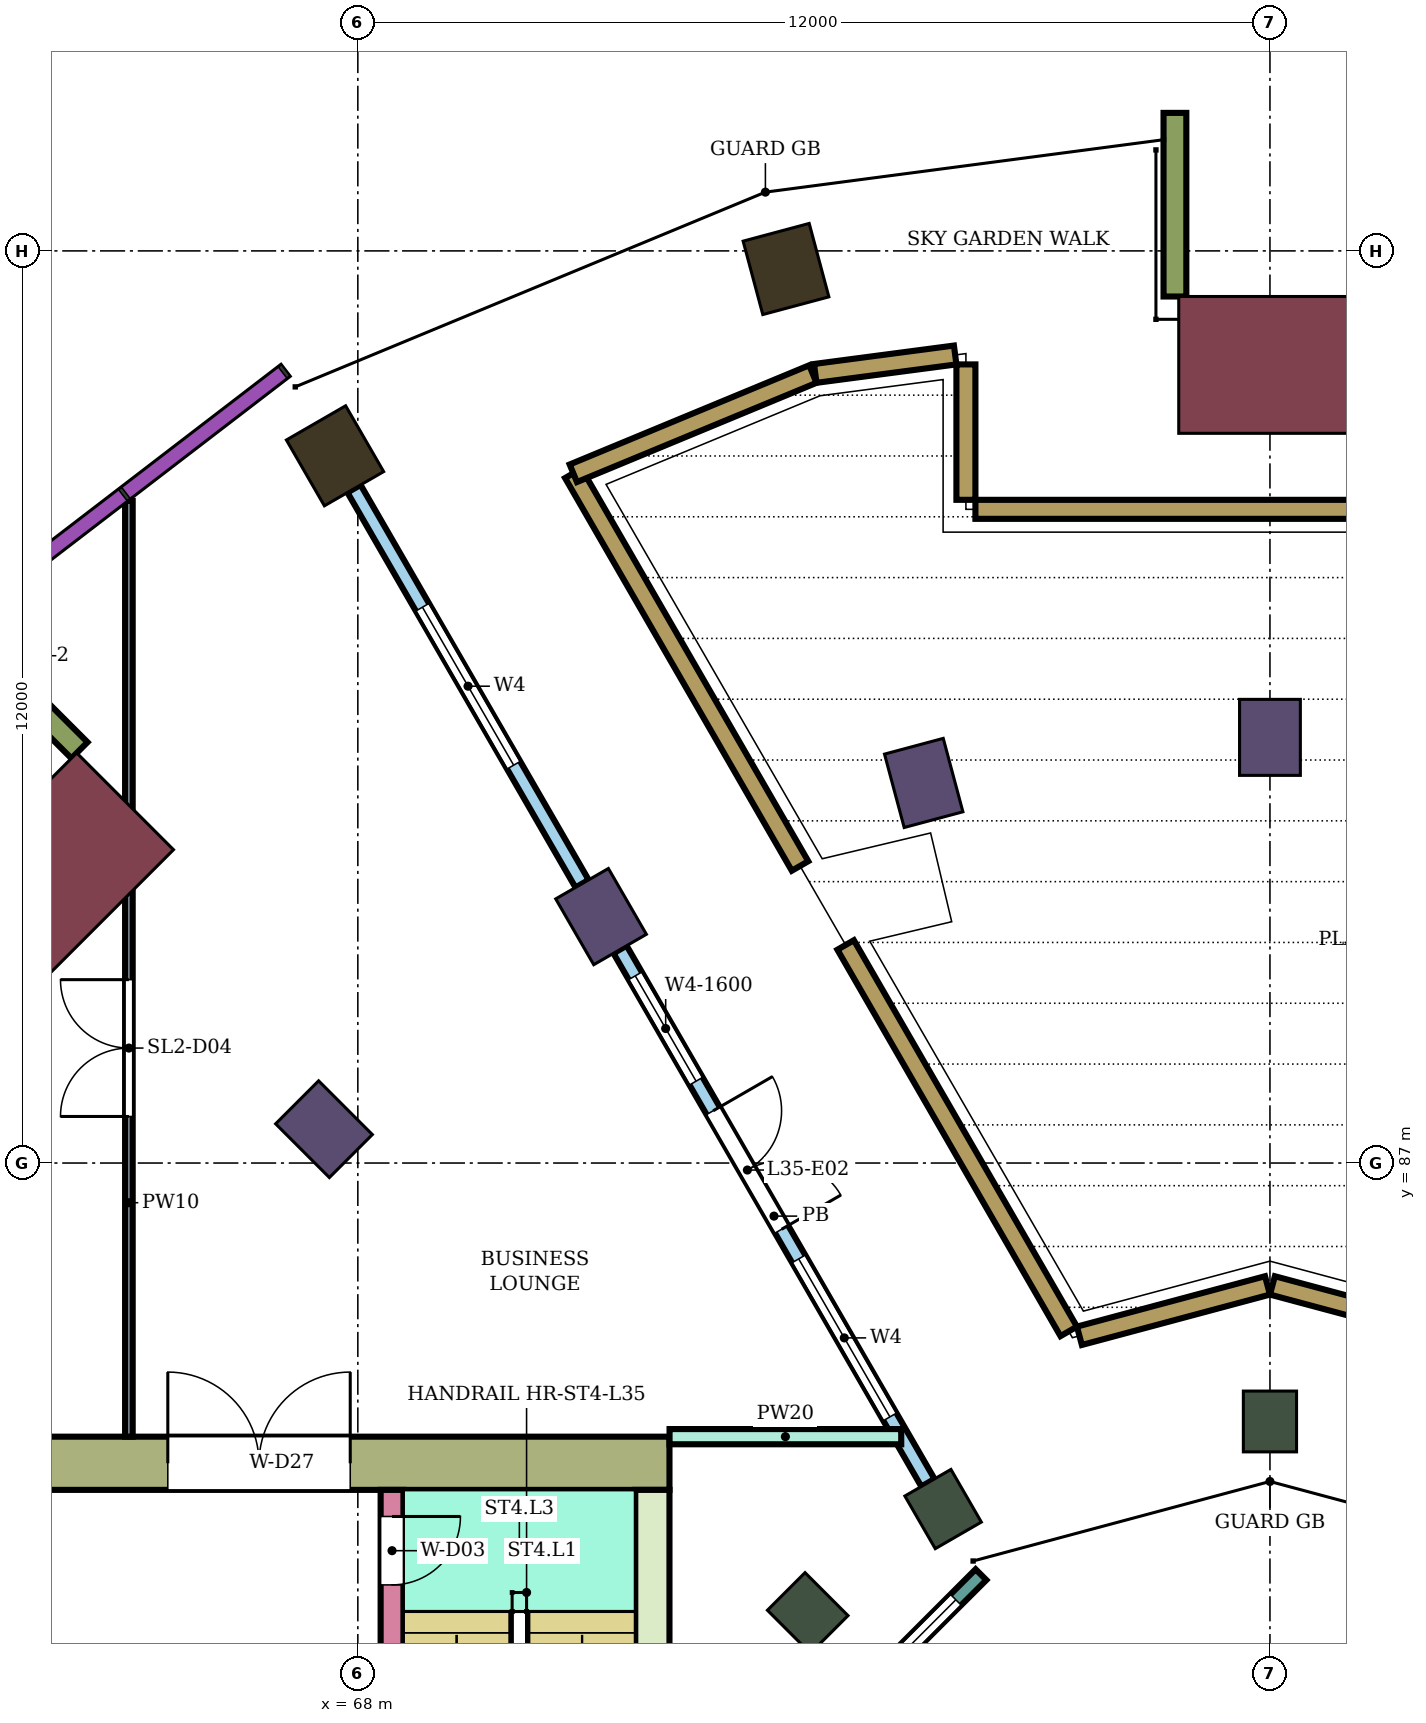
"""IFC4 building model, lengths in metres.
Left out: names, types, materials, properties, quantities, classifications, styles, units other than length and angle.
Written with IfcOpenShell. Run it as: python <this file> out.ifc"""

import sys

from ifc_helpers import new_model, si_unit, direction, frame, frame_2d, origin, origin_2d, place, context, subcontext, project, spatial, rectangle, extrude, element, fill, save


model = new_model("IFC4")
c1 = context("Model", 3, precision=1e-05, world=origin(), true_north=direction((0.0, 1.0)))
c2 = subcontext(c1, "Body", "Model", "MODEL_VIEW")
j1 = project(units=[si_unit("LENGTHUNIT", "METRE"), si_unit("PLANEANGLEUNIT", "RADIAN")], contexts=[c1])
p1 = place(None, origin())
s1 = spatial("IfcSite", under=j1, at=p1, CompositionType="ELEMENT")
p2 = place(p1, origin())
s2 = spatial("IfcBuilding", under=s1, at=p2, CompositionType="ELEMENT")
p3 = place(p2, frame((0.0, 0.0, 149.7)))
s3 = spatial("IfcBuildingStorey", under=s2, at=p3, CompositionType="ELEMENT", Elevation=149.7)
for number, where, z_axis, x_axis in (
    (1, (73.633, 98.762, 0.0), (0.0, 0.0, 1.0), (-0.259, 0.966, 0.0)),
    (2, (67.7, 96.304, 0.0), (0.0, 0.0, 1.0), (-0.5, 0.866, 0.0)),
):
    element("IfcColumn", number, at=place(p3, frame(where, z_axis=z_axis, x_axis=x_axis)), inside=s3, PredefinedType="COLUMN", context=c2, shape_type="SweptSolid", body=[
        extrude(rectangle(XDim=1.0, YDim=0.9, at=origin_2d()), origin(), (0.0, 0.0, 1.0), 8.0),
    ])
for number, where, z_axis, x_axis in (
    (3, (80.0, 92.6, 0.0), (0.0, 0.0, 1.0), (0.0, 1.0, 0.0)),
    (4, (75.445, 92.0, 0.0), (0.0, 0.0, 1.0), (-0.259, 0.966, 0.0)),
    (5, (71.2, 90.242, 0.0), (0.0, 0.0, 1.0), (-0.5, 0.866, 0.0)),
    (6, (67.555, 87.445, 0.0), (0.0, 0.0, 1.0), (-0.707, 0.707, 0.0)),
):
    element("IfcColumn", number, at=place(p3, frame(where, z_axis=z_axis, x_axis=x_axis)), inside=s3, PredefinedType="COLUMN", context=c2, shape_type="SweptSolid", body=[
        extrude(rectangle(XDim=1.0, YDim=0.8, at=origin_2d()), origin(), (0.0, 0.0, 1.0), 8.0),
    ])
for number, where, z_axis, x_axis in (
    (7, (80.0, 83.6, 0.0), (0.0, 0.0, 1.0), (0.0, 1.0, 0.0)),
    (8, (75.7, 82.448, 0.0), (0.0, 0.0, 1.0), (-0.5, 0.866, 0.0)),
    (9, (73.919, 81.081, 0.0), (0.0, 0.0, 1.0), (-0.707, 0.707, 0.0)),
):
    element("IfcColumn", number, at=place(p3, frame(where, z_axis=z_axis, x_axis=x_axis)), inside=s3, PredefinedType="COLUMN", context=c2, shape_type="SweptSolid", body=[
        extrude(rectangle(XDim=0.8, YDim=0.7, at=origin_2d()), origin(), (0.0, 0.0, 1.0), 8.0),
    ])
for number, where, z_axis, x_axis in (
    (10, (80.0, 97.5, 0.0), (0.0, 0.0, 1.0), (0.0, 1.0, 0.0)),
    (11, (64.09, 90.91, 0.0), (0.0, 0.0, 1.0), (-0.707, 0.707, 0.0)),
):
    element("IfcColumn", number, at=place(p3, frame(where, z_axis=z_axis, x_axis=x_axis)), inside=s3, PredefinedType="COLUMN", context=c2, shape_type="SweptSolid", body=[
        extrude(rectangle(XDim=1.8, YDim=2.4, at=origin_2d()), origin(), (0.0, 0.0, 1.0), 8.0),
    ])
p4 = place(p3, frame((72.1, 83.05, 0.0), z_axis=(0.0, 0.0, 1.0), x_axis=(-1.0, 0.0, 0.0)))
e12 = element("IfcWall", 12, at=p4, inside=s3, PredefinedType="SHEAR", context=c2, shape_type="SweptSolid", body=[
    extrude(rectangle(XDim=14.8, YDim=0.7, at=frame_2d((7.4, 0.0))), origin(), (0.0, 0.0, 1.0), 7.68),
])
p5 = place(p4, frame((4.2, 0.0, 0.0)))
e13 = element("IfcOpeningElement", 13, at=p5, cuts=e12, PredefinedType="OPENING", context=c2, shape_type="SweptSolid", body=[
    extrude(rectangle(XDim=2.4, YDim=2.4, at=frame_2d((1.2, 1.2))), frame((0.0, 0.36, 0.0), z_axis=(0.0, -1.0, 0.0), x_axis=(1.0, 0.0, 0.0)), (0.0, 0.0, 1.0), 0.72),
])
p6 = place(p3, frame((71.875, 82.7, 0.0), z_axis=(0.0, 0.0, 1.0), x_axis=(0.0, -1.0, 0.0)))
e14 = element("IfcWall", 14, at=p6, inside=s3, PredefinedType="SHEAR", context=c2, shape_type="SweptSolid", body=[
    extrude(rectangle(XDim=7.7, YDim=0.45, at=frame_2d((3.85, 0.0))), origin(), (0.0, 0.0, 1.0), 7.68),
])
p7 = place(p3, frame((68.45, 82.7, 0.0), z_axis=(0.0, 0.0, 1.0), x_axis=(0.0, -1.0, 0.0)))
e15 = element("IfcWall", 15, at=p7, inside=s3, PredefinedType="SHEAR", context=c2, shape_type="SweptSolid", body=[
    extrude(rectangle(XDim=7.7, YDim=0.3, at=frame_2d((3.85, 0.0))), origin(), (0.0, 0.0, 1.0), 7.68),
])
p8 = place(p7, frame((0.35, 0.0, 0.0)))
e16 = element("IfcOpeningElement", 16, at=p8, cuts=e15, PredefinedType="OPENING", context=c2, shape_type="SweptSolid", body=[
    extrude(rectangle(XDim=0.9, YDim=2.1, at=frame_2d((0.45, 1.05))), frame((0.0, 0.16, 0.0), z_axis=(0.0, -1.0, 0.0), x_axis=(1.0, 0.0, 0.0)), (0.0, 0.0, 1.0), 0.32),
])
for number, where, z_axis, x_axis in (
    (17, (78.75, 98.4, 0.0), (0.0, 0.0, 1.0), (0.0, 1.0, 0.0)),
    (18, (64.338, 92.43, 0.0), (0.0, 0.0, 1.0), (-0.707, 0.707, 0.0)),
):
    element("IfcWall", number, at=place(p3, frame(where, z_axis=z_axis, x_axis=x_axis)), inside=s3, PredefinedType="NOTDEFINED", context=c2, shape_type="SweptSolid", body=[
        extrude(rectangle(XDim=2.416, YDim=0.3, at=frame_2d((1.208, 0.0))), origin(), (0.0, 0.0, 1.0), 8.0),
    ])
p9 = place(p3, frame((76.198, 81.585, 0.0), z_axis=(0.0, 0.0, 1.0), x_axis=(-0.707106781187, -0.707106781187, 0.0)))
e19 = element("IfcWall", 19, at=p9, inside=s3, PredefinedType="NOTDEFINED", context=c2, shape_type="SweptSolid", body=[
    extrude(rectangle(XDim=3.936, YDim=0.2, at=frame_2d((1.968, 0.0))), origin(), (0.0, 0.0, 1.0), 8.0),
])
p10 = place(p9, frame((0.468, 0.0, 0.9)))
e20 = element("IfcOpeningElement", 20, at=p10, cuts=e19, PredefinedType="OPENING", context=c2, shape_type="SweptSolid", body=[
    extrude(rectangle(XDim=3.0, YDim=2.3, at=frame_2d((1.5, 1.15))), frame((0.0, 0.11, 0.0), z_axis=(0.0, -1.0, 0.0), x_axis=(1.0, 0.0, 0.0)), (0.0, 0.0, 1.0), 0.22),
])
p11 = place(p3, frame((70.835, 96.074, 0.0), z_axis=(0.0, 0.0, 1.0), x_axis=(0.500003486784, -0.866023390679, 0.0)))
e21 = element("IfcWall", 21, at=p11, inside=s3, PredefinedType="USERDEFINED", context=c2, shape_type="SweptSolid", body=[
    extrude(rectangle(XDim=5.966, YDim=0.25, at=frame_2d((2.983, 0.0))), origin(), (0.0, 0.0, 1.0), 0.6),
])
p12 = place(p3, frame((74.418, 89.869, 0.0), z_axis=(0.0, 0.0, 1.0), x_axis=(0.499999689456, -0.866025583077, 0.0)))
e22 = element("IfcWall", 22, at=p12, inside=s3, PredefinedType="USERDEFINED", context=c2, shape_type="SweptSolid", body=[
    extrude(rectangle(XDim=5.87, YDim=0.25, at=frame_2d((2.935, 0.0))), origin(), (0.0, 0.0, 1.0), 0.6),
])
for number, where, z_axis, x_axis in (
    (23, (77.493, 84.727, 0.0), (0.0, 0.0, 1.0), (0.966, 0.259, 0.0)),
    (24, (80.032, 85.39, 0.0), (0.0, 0.0, 1.0), (0.966, -0.259, 0.0)),
):
    element("IfcWall", number, at=place(p3, frame(where, z_axis=z_axis, x_axis=x_axis)), inside=s3, PredefinedType="USERDEFINED", context=c2, shape_type="SweptSolid", body=[
        extrude(rectangle(XDim=2.562, YDim=0.25, at=frame_2d((1.281, 0.0))), origin(), (0.0, 0.0, 1.0), 0.6),
    ])
p13 = place(p3, frame((83.875, 95.6, 0.0), z_axis=(0.0, 0.0, 1.0), x_axis=(-1.0, 0.0, 0.0)))
e25 = element("IfcWall", 25, at=p13, inside=s3, PredefinedType="USERDEFINED", context=c2, shape_type="SweptSolid", body=[
    extrude(rectangle(XDim=7.75, YDim=0.25, at=frame_2d((3.875, 0.0))), origin(), (0.0, 0.0, 1.0), 0.6),
])
p14 = place(p3, frame((76.0, 95.725, 0.0), z_axis=(0.0, 0.0, 1.0), x_axis=(0.0, 1.0, 0.0)))
e26 = element("IfcWall", 26, at=p14, inside=s3, PredefinedType="USERDEFINED", context=c2, shape_type="SweptSolid", body=[
    extrude(rectangle(XDim=1.781, YDim=0.25, at=frame_2d((0.891, 0.0))), origin(), (0.0, 0.0, 1.0), 0.6),
])
p15 = place(p3, frame((75.859, 97.631, 0.0), z_axis=(0.0, 0.0, 1.0), x_axis=(-0.991436829887, -0.130587182926, 0.0)))
e27 = element("IfcWall", 27, at=p15, inside=s3, PredefinedType="USERDEFINED", context=c2, shape_type="SweptSolid", body=[
    extrude(rectangle(XDim=1.856, YDim=0.25, at=frame_2d((0.928, 0.0))), origin(), (0.0, 0.0, 1.0), 0.6),
])
p16 = place(p3, frame((73.986, 97.38, 0.0), z_axis=(0.0, 0.0, 1.0), x_axis=(-0.923871147788, -0.38270367425, 0.0)))
e28 = element("IfcWall", 28, at=p16, inside=s3, PredefinedType="USERDEFINED", context=c2, shape_type="SweptSolid", body=[
    extrude(rectangle(XDim=3.411, YDim=0.25, at=frame_2d((1.706, 0.0))), origin(), (0.0, 0.0, 1.0), 0.6),
])
p17 = place(p3, frame((75.5, 82.794, 0.0), z_axis=(0.0, 0.0, 1.0), x_axis=(-0.499999880539, 0.866025472755, 0.0)))
e29 = element("IfcWall", 29, at=p17, inside=s3, PredefinedType="NOTDEFINED", context=c2, shape_type="SweptSolid", body=[
    extrude(rectangle(XDim=8.1, YDim=0.2, at=frame_2d((4.05, 0.0))), origin(), (0.0, 0.0, 1.0), 8.0),
])
p18 = place(p17, frame((1.0, 0.0, 0.3)))
e30 = element("IfcOpeningElement", 30, at=p18, cuts=e29, PredefinedType="OPENING", context=c2, shape_type="SweptSolid", body=[
    extrude(rectangle(XDim=2.4, YDim=3.6, at=frame_2d((1.2, 1.8))), frame((0.0, 0.11, 0.0), z_axis=(0.0, -1.0, 0.0), x_axis=(1.0, 0.0, 0.0)), (0.0, 0.0, 1.0), 0.22),
])
p19 = place(p17, frame((3.85, 0.0, 0.0)))
e31 = element("IfcOpeningElement", 31, at=p19, cuts=e29, PredefinedType="OPENING", context=c2, shape_type="SweptSolid", body=[
    extrude(rectangle(XDim=1.8, YDim=2.4, at=frame_2d((0.9, 1.2))), frame((0.0, 0.11, 0.0), z_axis=(0.0, -1.0, 0.0), x_axis=(1.0, 0.0, 0.0)), (0.0, 0.0, 1.0), 0.22),
])
p20 = place(p17, frame((6.1, 0.0, 0.3)))
e32 = element("IfcOpeningElement", 32, at=p20, cuts=e29, PredefinedType="OPENING", context=c2, shape_type="SweptSolid", body=[
    extrude(rectangle(XDim=1.6, YDim=3.6, at=frame_2d((0.8, 1.8))), frame((0.0, 0.11, 0.0), z_axis=(0.0, -1.0, 0.0), x_axis=(1.0, 0.0, 0.0)), (0.0, 0.0, 1.0), 0.22),
])
p21 = place(p3, frame((70.95, 90.675, 0.0), z_axis=(0.0, 0.0, 1.0), x_axis=(-0.500007758305, 0.866020924479, 0.0)))
e33 = element("IfcWall", 33, at=p21, inside=s3, PredefinedType="NOTDEFINED", context=c2, shape_type="SweptSolid", body=[
    extrude(rectangle(XDim=6.0, YDim=0.2, at=frame_2d((3.0, 0.0))), origin(), (0.0, 0.0, 1.0), 8.0),
])
p22 = place(p21, frame((1.8, 0.0, 0.3)))
e34 = element("IfcOpeningElement", 34, at=p22, cuts=e33, PredefinedType="OPENING", context=c2, shape_type="SweptSolid", body=[
    extrude(rectangle(XDim=2.4, YDim=3.6, at=frame_2d((1.2, 1.8))), frame((0.0, 0.11, 0.0), z_axis=(0.0, -1.0, 0.0), x_axis=(1.0, 0.0, 0.0)), (0.0, 0.0, 1.0), 0.22),
])
p23 = place(p3, frame((72.101, 83.4, 0.0), z_axis=(0.0, 0.0, 1.0), x_axis=(1.0, 0.0, 0.0)))
e35 = element("IfcWall", 35, at=p23, inside=s3, PredefinedType="PARTITIONING", context=c2, shape_type="SweptSolid", body=[
    extrude(rectangle(XDim=3.048, YDim=0.2, at=frame_2d((1.524, 0.0))), origin(), (0.0, 0.0, 1.0), 7.55),
])
p24 = place(p3, frame((64.988, 83.4, 0.0), z_axis=(0.0, 0.0, 1.0), x_axis=(0.0, 1.0, 0.0)))
e36 = element("IfcWall", 36, at=p24, inside=s3, PredefinedType="PARTITIONING", context=c2, shape_type="SweptSolid", body=[
    extrude(rectangle(XDim=12.312, YDim=0.1, at=frame_2d((6.156, 0.0))), origin(), (0.0, 0.0, 1.0), 7.55),
])
p25 = place(p24, frame((4.212, 0.0, 0.0)))
e37 = element("IfcOpeningElement", 37, at=p25, cuts=e36, PredefinedType="OPENING", context=c2, shape_type="SweptSolid", body=[
    extrude(rectangle(XDim=1.8, YDim=2.1, at=frame_2d((0.9, 1.05))), frame((0.0, 0.06, 0.0), z_axis=(0.0, -1.0, 0.0), x_axis=(1.0, 0.0, 0.0)), (0.0, 0.0, 1.0), 0.12),
])
p26 = place(p10, origin())
e38 = element("IfcWindow", 38, at=p26, inside=s3, PartitioningType="SINGLE_PANEL", PredefinedType="WINDOW", context=c2, shape_type="SweptSolid", body=[
    extrude(rectangle(XDim=3.0, YDim=2.3, at=frame_2d((1.5, 1.15))), frame((0.0, 0.03, 0.0), z_axis=(0.0, -1.0, 0.0), x_axis=(1.0, 0.0, 0.0)), (0.0, 0.0, 1.0), 0.06),
])
fill(e20, e38)
p27 = place(p18, origin())
e39 = element("IfcWindow", 39, at=p27, inside=s3, PartitioningType="SINGLE_PANEL", PredefinedType="WINDOW", context=c2, shape_type="SweptSolid", body=[
    extrude(rectangle(XDim=2.4, YDim=3.6, at=frame_2d((1.2, 1.8))), frame((0.0, 0.03, 0.0), z_axis=(0.0, -1.0, 0.0), x_axis=(1.0, 0.0, 0.0)), (0.0, 0.0, 1.0), 0.06),
])
fill(e30, e39)
p28 = place(p19, frame((1.8, 0.0, 0.0), z_axis=(0.0, 0.0, 1.0), x_axis=(-1.0, 0.0, 0.0)))
e40 = element("IfcDoor", 40, at=p28, inside=s3, OperationType="DOUBLE_DOOR_SINGLE_SWING", PredefinedType="DOOR", context=c2, shape_type="SweptSolid", body=[
    extrude(rectangle(XDim=1.8, YDim=2.4, at=frame_2d((0.9, 1.2))), frame((0.0, 0.025, 0.0), z_axis=(0.0, -1.0, 0.0), x_axis=(1.0, 0.0, 0.0)), (0.0, 0.0, 1.0), 0.05),
])
fill(e31, e40)
p29 = place(p20, origin())
e41 = element("IfcWindow", 41, at=p29, inside=s3, PartitioningType="SINGLE_PANEL", PredefinedType="WINDOW", context=c2, shape_type="SweptSolid", body=[
    extrude(rectangle(XDim=1.6, YDim=3.6, at=frame_2d((0.8, 1.8))), frame((0.0, 0.03, 0.0), z_axis=(0.0, -1.0, 0.0), x_axis=(1.0, 0.0, 0.0)), (0.0, 0.0, 1.0), 0.06),
])
fill(e32, e41)
p30 = place(p22, origin())
e42 = element("IfcWindow", 42, at=p30, inside=s3, PartitioningType="SINGLE_PANEL", PredefinedType="WINDOW", context=c2, shape_type="SweptSolid", body=[
    extrude(rectangle(XDim=2.4, YDim=3.6, at=frame_2d((1.2, 1.8))), frame((0.0, 0.03, 0.0), z_axis=(0.0, -1.0, 0.0), x_axis=(1.0, 0.0, 0.0)), (0.0, 0.0, 1.0), 0.06),
])
fill(e34, e42)
p31 = place(p25, origin())
e43 = element("IfcDoor", 43, at=p31, inside=s3, OperationType="DOUBLE_DOOR_SINGLE_SWING", PredefinedType="DOOR", context=c2, shape_type="SweptSolid", body=[
    extrude(rectangle(XDim=1.8, YDim=2.1, at=frame_2d((0.9, 1.05))), frame((0.0, 0.025, 0.0), z_axis=(0.0, -1.0, 0.0), x_axis=(1.0, 0.0, 0.0)), (0.0, 0.0, 1.0), 0.05),
])
fill(e37, e43)
p32 = place(p8, origin())
e44 = element("IfcDoor", 44, at=p32, inside=s3, OperationType="SINGLE_SWING_LEFT", PredefinedType="DOOR", context=c2, shape_type="SweptSolid", body=[
    extrude(rectangle(XDim=0.9, YDim=2.1, at=frame_2d((0.45, 1.05))), frame((0.0, 0.025, 0.0), z_axis=(0.0, -1.0, 0.0), x_axis=(1.0, 0.0, 0.0)), (0.0, 0.0, 1.0), 0.05),
])
fill(e16, e44)
p33 = place(p5, frame((2.4, 0.0, 0.0), z_axis=(0.0, 0.0, 1.0), x_axis=(-1.0, 0.0, 0.0)))
e45 = element("IfcDoor", 45, at=p33, inside=s3, OperationType="DOUBLE_DOOR_SINGLE_SWING", PredefinedType="DOOR", context=c2, shape_type="SweptSolid", body=[
    extrude(rectangle(XDim=2.4, YDim=2.4, at=frame_2d((1.2, 1.2))), frame((0.0, 0.025, 0.0), z_axis=(0.0, -1.0, 0.0), x_axis=(1.0, 0.0, 0.0)), (0.0, 0.0, 1.0), 0.05),
])
fill(e13, e45)
save(model, sys.argv[1])
